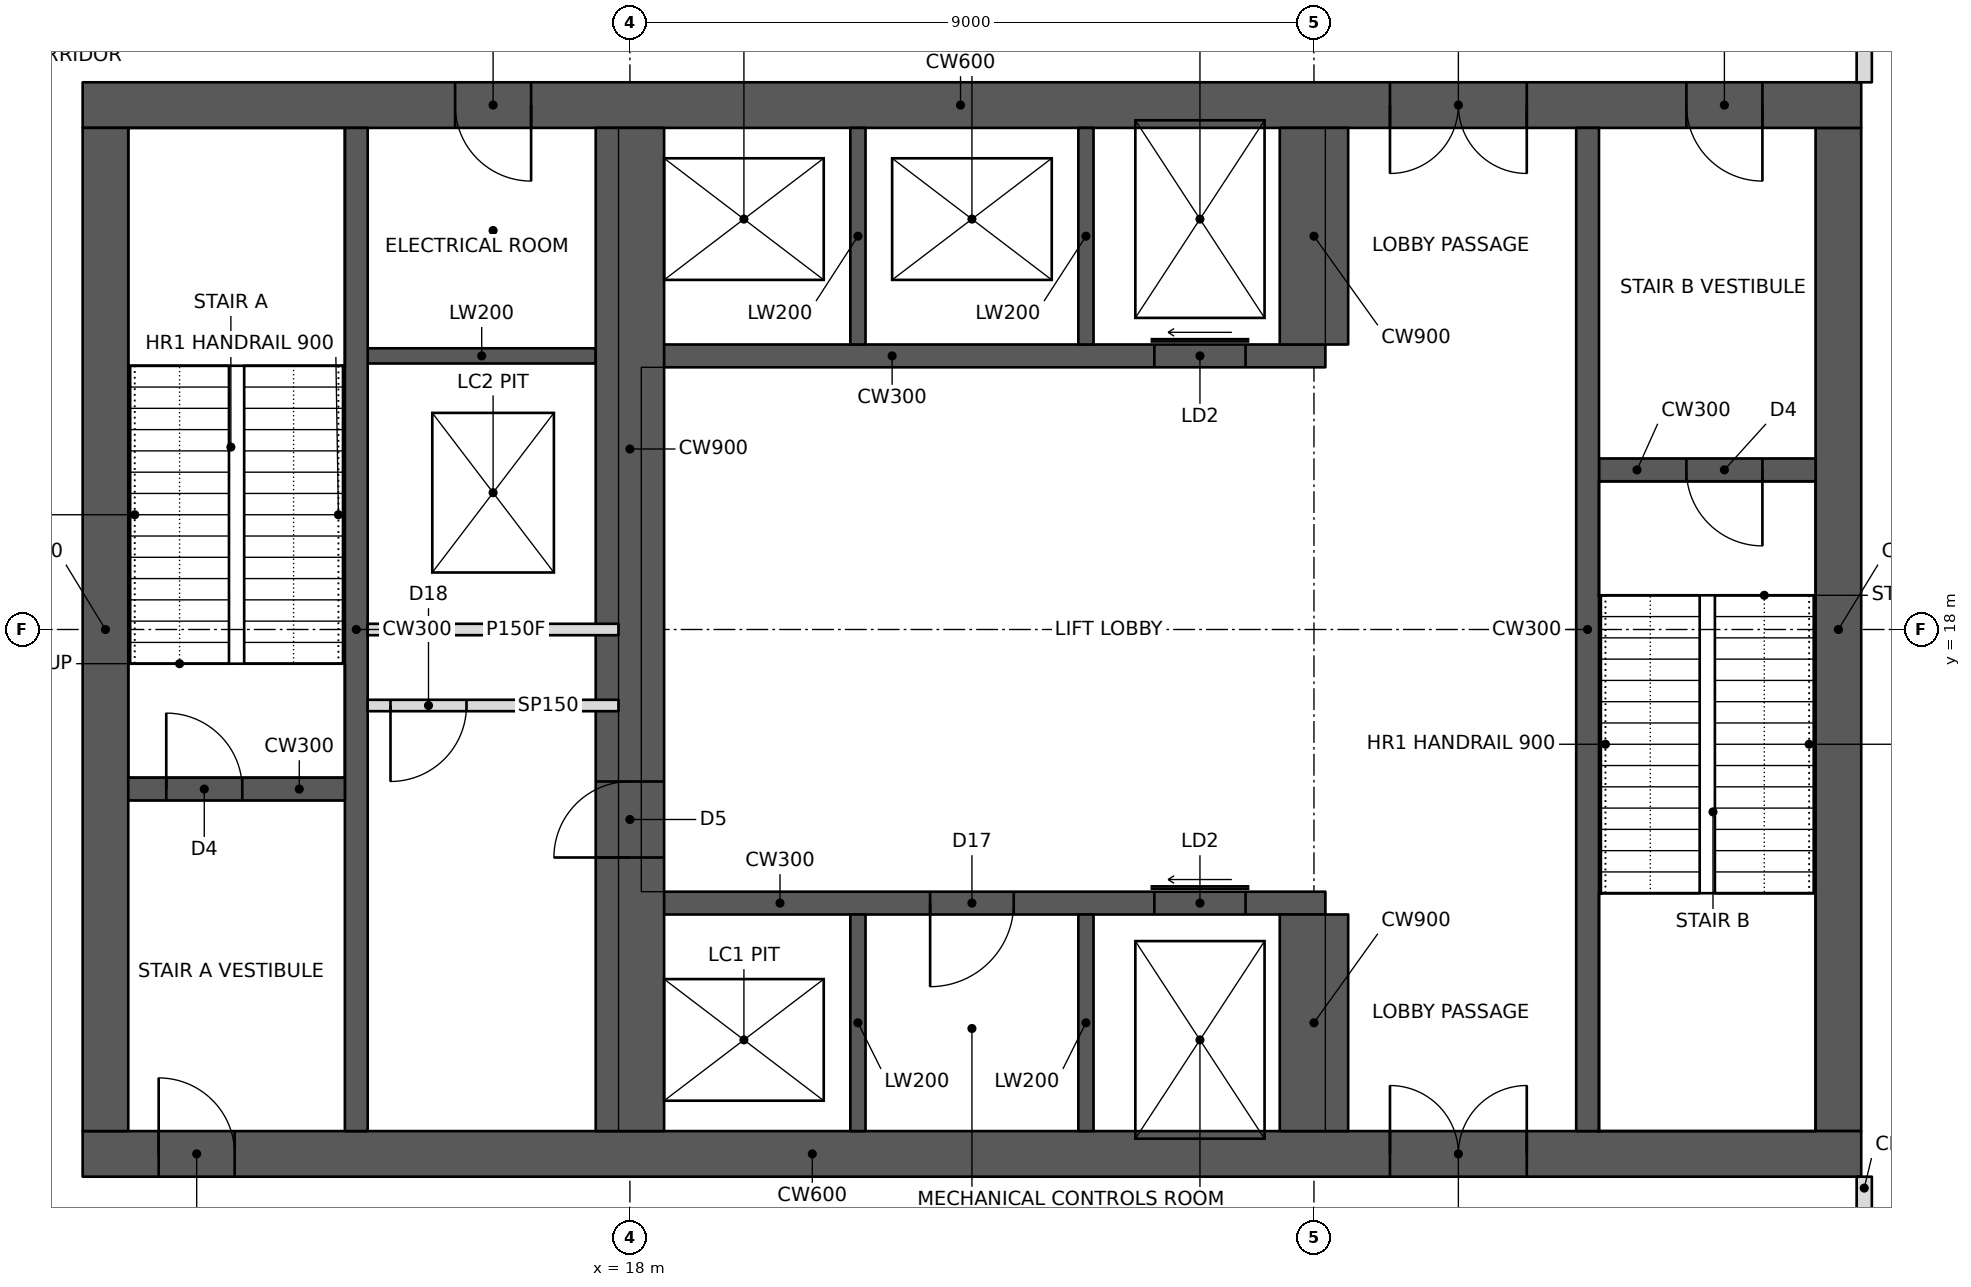
"""IFC4 building model, lengths in metres.
Left out: names, types, materials, properties, quantities, classifications, styles, units other than length and angle.
Written with IfcOpenShell. Run it as: python <this file> out.ifc"""

import sys

from ifc_helpers import new_model, si_unit, direction, frame, frame_2d, origin, place, context, subcontext, project, spatial, rectangle, extrude, element, fill, save


model = new_model("IFC4")
c1 = context("Model", 3, precision=1e-05, world=origin(), true_north=direction((0.0, 1.0)))
c2 = subcontext(c1, "Body", "Model", "MODEL_VIEW")
j1 = project(units=[si_unit("LENGTHUNIT", "METRE"), si_unit("PLANEANGLEUNIT", "RADIAN")], contexts=[c1])
p1 = place(None, origin())
s1 = spatial("IfcSite", under=j1, at=p1, CompositionType="ELEMENT")
p2 = place(p1, origin())
s2 = spatial("IfcBuilding", under=s1, at=p2, CompositionType="ELEMENT")
p3 = place(p2, frame((0.0, 0.0, 155.4)))
s3 = spatial("IfcBuildingStorey", under=s2, at=p3, CompositionType="ELEMENT", Elevation=155.4)
p4 = place(p3, frame((10.8, 11.1, 0.0), z_axis=(0.0, 0.0, 1.0), x_axis=(1.0, 0.0, 0.0)))
e1 = element("IfcWall", 1, at=p4, inside=s3, PredefinedType="SHEAR", context=c2, shape_type="SweptSolid", body=[
    extrude(rectangle(XDim=23.4, YDim=0.6, at=frame_2d((11.7, 0.0))), origin(), (0.0, 0.0, 1.0), 5.0),
])
p5 = place(p4, frame((1.0, 0.0, 0.0)))
e2 = element("IfcOpeningElement", 2, at=p5, cuts=e1, PredefinedType="OPENING", context=c2, shape_type="SweptSolid", body=[
    extrude(rectangle(XDim=1.0, YDim=2.1, at=frame_2d((0.5, 1.05))), frame((0.0, 0.31, 0.0), z_axis=(0.0, -1.0, 0.0), x_axis=(1.0, 0.0, 0.0)), (0.0, 0.0, 1.0), 0.62),
])
p6 = place(p4, frame((17.2, 0.0, 0.0)))
e3 = element("IfcOpeningElement", 3, at=p6, cuts=e1, PredefinedType="OPENING", context=c2, shape_type="SweptSolid", body=[
    extrude(rectangle(XDim=1.8, YDim=2.1, at=frame_2d((0.9, 1.05))), frame((0.0, 0.31, 0.0), z_axis=(0.0, -1.0, 0.0), x_axis=(1.0, 0.0, 0.0)), (0.0, 0.0, 1.0), 0.62),
])
p7 = place(p3, frame((10.8, 24.9, 0.0), z_axis=(0.0, 0.0, 1.0), x_axis=(1.0, 0.0, 0.0)))
e4 = element("IfcWall", 4, at=p7, inside=s3, PredefinedType="SHEAR", context=c2, shape_type="SweptSolid", body=[
    extrude(rectangle(XDim=23.4, YDim=0.6, at=frame_2d((11.7, 0.0))), origin(), (0.0, 0.0, 1.0), 5.0),
])
p8 = place(p7, frame((17.2, 0.0, 0.0)))
e5 = element("IfcOpeningElement", 5, at=p8, cuts=e4, PredefinedType="OPENING", context=c2, shape_type="SweptSolid", body=[
    extrude(rectangle(XDim=1.8, YDim=2.1, at=frame_2d((0.9, 1.05))), frame((0.0, 0.31, 0.0), z_axis=(0.0, -1.0, 0.0), x_axis=(1.0, 0.0, 0.0)), (0.0, 0.0, 1.0), 0.62),
])
p9 = place(p7, frame((21.1, 0.0, 0.0)))
e6 = element("IfcOpeningElement", 6, at=p9, cuts=e4, PredefinedType="OPENING", context=c2, shape_type="SweptSolid", body=[
    extrude(rectangle(XDim=1.0, YDim=2.1, at=frame_2d((0.5, 1.05))), frame((0.0, 0.31, 0.0), z_axis=(0.0, -1.0, 0.0), x_axis=(1.0, 0.0, 0.0)), (0.0, 0.0, 1.0), 0.62),
])
p10 = place(p7, frame((4.9, 0.0, 0.0)))
e7 = element("IfcOpeningElement", 7, at=p10, cuts=e4, PredefinedType="OPENING", context=c2, shape_type="SweptSolid", body=[
    extrude(rectangle(XDim=1.0, YDim=2.1, at=frame_2d((0.5, 1.05))), frame((0.0, 0.31, 0.0), z_axis=(0.0, -1.0, 0.0), x_axis=(1.0, 0.0, 0.0)), (0.0, 0.0, 1.0), 0.62),
])
for number, where, z_axis, x_axis in (
    (8, (11.1, 11.4, 0.0), (0.0, 0.0, 1.0), (0.0, 1.0, 0.0)),
    (9, (33.9, 11.4, 0.0), (0.0, 0.0, 1.0), (0.0, 1.0, 0.0)),
):
    element("IfcWall", number, at=place(p3, frame(where, z_axis=z_axis, x_axis=x_axis)), inside=s3, PredefinedType="SHEAR", context=c2, shape_type="SweptSolid", body=[
        extrude(rectangle(XDim=13.2, YDim=0.6, at=frame_2d((6.6, 0.0))), origin(), (0.0, 0.0, 1.0), 5.0),
    ])
p11 = place(p3, frame((14.4, 11.4, 0.0), z_axis=(0.0, 0.0, 1.0), x_axis=(0.0, 1.0, 0.0)))
e10 = element("IfcWall", 10, at=p11, inside=s3, PredefinedType="SHEAR", context=c2, shape_type="SweptSolid", body=[
    extrude(rectangle(XDim=13.2, YDim=0.3, at=frame_2d((6.6, 0.0))), origin(), (0.0, 0.0, 1.0), 5.0),
])
p12 = place(p3, frame((11.4, 15.9, 0.0), z_axis=(0.0, 0.0, 1.0), x_axis=(1.0, 0.0, 0.0)))
e11 = element("IfcWall", 11, at=p12, inside=s3, PredefinedType="SHEAR", context=c2, shape_type="SweptSolid", body=[
    extrude(rectangle(XDim=2.85, YDim=0.3, at=frame_2d((1.425, 0.0))), origin(), (0.0, 0.0, 1.0), 5.0),
])
p13 = place(p12, frame((0.5, 0.0, 0.0)))
e12 = element("IfcOpeningElement", 12, at=p13, cuts=e11, PredefinedType="OPENING", context=c2, shape_type="SweptSolid", body=[
    extrude(rectangle(XDim=1.0, YDim=2.1, at=frame_2d((0.5, 1.05))), frame((0.0, 0.16, 0.0), z_axis=(0.0, -1.0, 0.0), x_axis=(1.0, 0.0, 0.0)), (0.0, 0.0, 1.0), 0.32),
])
p14 = place(p3, frame((18.0, 11.4, 0.0), z_axis=(0.0, 0.0, 1.0), x_axis=(0.0, 1.0, 0.0)))
e13 = element("IfcWall", 13, at=p14, inside=s3, PredefinedType="SHEAR", context=c2, shape_type="SweptSolid", body=[
    extrude(rectangle(XDim=13.2, YDim=0.9, at=frame_2d((6.6, 0.0))), origin(), (0.0, 0.0, 1.0), 5.0),
])
p15 = place(p14, frame((3.6, 0.0, 0.0)))
e14 = element("IfcOpeningElement", 14, at=p15, cuts=e13, PredefinedType="OPENING", context=c2, shape_type="SweptSolid", body=[
    extrude(rectangle(XDim=1.0, YDim=2.1, at=frame_2d((0.5, 1.05))), frame((0.0, 0.46, 0.0), z_axis=(0.0, -1.0, 0.0), x_axis=(1.0, 0.0, 0.0)), (0.0, 0.0, 1.0), 0.92),
])
p16 = place(p3, frame((14.55, 18.0, 0.0), z_axis=(0.0, 0.0, 1.0), x_axis=(1.0, 0.0, 0.0)))
e15 = element("IfcWall", 15, at=p16, inside=s3, PredefinedType="PARTITIONING", context=c2, shape_type="SweptSolid", body=[
    extrude(rectangle(XDim=3.3, YDim=0.15, at=frame_2d((1.65, 0.0))), origin(), (0.0, 0.0, 1.0), 4.8),
])
p17 = place(p3, frame((18.15, 14.4, 0.0), z_axis=(0.0, 0.0, 1.0), x_axis=(1.0, 0.0, 0.0)))
e16 = element("IfcWall", 16, at=p17, inside=s3, PredefinedType="SHEAR", context=c2, shape_type="SweptSolid", body=[
    extrude(rectangle(XDim=9.0, YDim=0.3, at=frame_2d((4.5, 0.0))), origin(), (0.0, 0.0, 1.0), 5.0),
])
p18 = place(p17, frame((6.75, 0.0, 0.0)))
e17 = element("IfcOpeningElement", 17, at=p18, cuts=e16, PredefinedType="OPENING", context=c2, shape_type="SweptSolid", body=[
    extrude(rectangle(XDim=1.2, YDim=2.1, at=frame_2d((0.6, 1.05))), frame((0.0, 0.16, 0.0), z_axis=(0.0, -1.0, 0.0), x_axis=(1.0, 0.0, 0.0)), (0.0, 0.0, 1.0), 0.32),
])
p19 = place(p17, frame((3.8, 0.0, 0.0)))
e18 = element("IfcOpeningElement", 18, at=p19, cuts=e16, PredefinedType="OPENING", context=c2, shape_type="SweptSolid", body=[
    extrude(rectangle(XDim=1.1, YDim=2.1, at=frame_2d((0.55, 1.05))), frame((0.0, 0.16, 0.0), z_axis=(0.0, -1.0, 0.0), x_axis=(1.0, 0.0, 0.0)), (0.0, 0.0, 1.0), 0.32),
])
p20 = place(p3, frame((27.0, 11.4, 0.0), z_axis=(0.0, 0.0, 1.0), x_axis=(0.0, 1.0, 0.0)))
e19 = element("IfcWall", 19, at=p20, inside=s3, PredefinedType="SHEAR", context=c2, shape_type="SweptSolid", body=[
    extrude(rectangle(XDim=2.85, YDim=0.9, at=frame_2d((1.425, 0.0))), origin(), (0.0, 0.0, 1.0), 5.0),
])
for number, where, z_axis, x_axis in (
    (20, (21.0, 11.4, 0.0), (0.0, 0.0, 1.0), (0.0, 1.0, 0.0)),
    (21, (24.0, 11.4, 0.0), (0.0, 0.0, 1.0), (0.0, 1.0, 0.0)),
):
    element("IfcWall", number, at=place(p3, frame(where, z_axis=z_axis, x_axis=x_axis)), inside=s3, PredefinedType="SHEAR", context=c2, shape_type="SweptSolid", body=[
        extrude(rectangle(XDim=2.85, YDim=0.2, at=frame_2d((1.425, 0.0))), origin(), (0.0, 0.0, 1.0), 5.0),
    ])
p21 = place(p3, frame((18.15, 21.6, 0.0), z_axis=(0.0, 0.0, 1.0), x_axis=(1.0, 0.0, 0.0)))
e22 = element("IfcWall", 22, at=p21, inside=s3, PredefinedType="SHEAR", context=c2, shape_type="SweptSolid", body=[
    extrude(rectangle(XDim=9.0, YDim=0.3, at=frame_2d((4.5, 0.0))), origin(), (0.0, 0.0, 1.0), 5.0),
])
p22 = place(p21, frame((6.75, 0.0, 0.0)))
e23 = element("IfcOpeningElement", 23, at=p22, cuts=e22, PredefinedType="OPENING", context=c2, shape_type="SweptSolid", body=[
    extrude(rectangle(XDim=1.2, YDim=2.1, at=frame_2d((0.6, 1.05))), frame((0.0, 0.16, 0.0), z_axis=(0.0, -1.0, 0.0), x_axis=(1.0, 0.0, 0.0)), (0.0, 0.0, 1.0), 0.32),
])
p23 = place(p3, frame((27.0, 21.75, 0.0), z_axis=(0.0, 0.0, 1.0), x_axis=(0.0, 1.0, 0.0)))
e24 = element("IfcWall", 24, at=p23, inside=s3, PredefinedType="SHEAR", context=c2, shape_type="SweptSolid", body=[
    extrude(rectangle(XDim=2.85, YDim=0.9, at=frame_2d((1.425, 0.0))), origin(), (0.0, 0.0, 1.0), 5.0),
])
for number, where, z_axis, x_axis in (
    (25, (21.0, 21.75, 0.0), (0.0, 0.0, 1.0), (0.0, 1.0, 0.0)),
    (26, (24.0, 21.75, 0.0), (0.0, 0.0, 1.0), (0.0, 1.0, 0.0)),
):
    element("IfcWall", number, at=place(p3, frame(where, z_axis=z_axis, x_axis=x_axis)), inside=s3, PredefinedType="SHEAR", context=c2, shape_type="SweptSolid", body=[
        extrude(rectangle(XDim=2.85, YDim=0.2, at=frame_2d((1.425, 0.0))), origin(), (0.0, 0.0, 1.0), 5.0),
    ])
p24 = place(p3, frame((30.6, 11.4, 0.0), z_axis=(0.0, 0.0, 1.0), x_axis=(0.0, 1.0, 0.0)))
e27 = element("IfcWall", 27, at=p24, inside=s3, PredefinedType="SHEAR", context=c2, shape_type="SweptSolid", body=[
    extrude(rectangle(XDim=13.2, YDim=0.3, at=frame_2d((6.6, 0.0))), origin(), (0.0, 0.0, 1.0), 5.0),
])
p25 = place(p3, frame((30.75, 20.1, 0.0), z_axis=(0.0, 0.0, 1.0), x_axis=(1.0, 0.0, 0.0)))
e28 = element("IfcWall", 28, at=p25, inside=s3, PredefinedType="SHEAR", context=c2, shape_type="SweptSolid", body=[
    extrude(rectangle(XDim=2.85, YDim=0.3, at=frame_2d((1.425, 0.0))), origin(), (0.0, 0.0, 1.0), 5.0),
])
p26 = place(p25, frame((1.15, 0.0, 0.0)))
e29 = element("IfcOpeningElement", 29, at=p26, cuts=e28, PredefinedType="OPENING", context=c2, shape_type="SweptSolid", body=[
    extrude(rectangle(XDim=1.0, YDim=2.1, at=frame_2d((0.5, 1.05))), frame((0.0, 0.16, 0.0), z_axis=(0.0, -1.0, 0.0), x_axis=(1.0, 0.0, 0.0)), (0.0, 0.0, 1.0), 0.32),
])
p27 = place(p3, frame((14.55, 21.6, 0.0), z_axis=(0.0, 0.0, 1.0), x_axis=(1.0, 0.0, 0.0)))
e30 = element("IfcWall", 30, at=p27, inside=s3, PredefinedType="SHEAR", context=c2, shape_type="SweptSolid", body=[
    extrude(rectangle(XDim=3.0, YDim=0.2, at=frame_2d((1.5, 0.0))), origin(), (0.0, 0.0, 1.0), 5.0),
])
p28 = place(p3, frame((34.24, 9.1, 0.0), z_axis=(0.0, 0.0, 1.0), x_axis=(0.0, 1.0, 0.0)))
e31 = element("IfcWall", 31, at=p28, inside=s3, PredefinedType="PARTITIONING", context=c2, shape_type="SweptSolid", body=[
    extrude(rectangle(XDim=1.7, YDim=0.2, at=frame_2d((0.85, 0.0))), origin(), (0.0, 0.0, 1.0), 4.004),
])
p29 = place(p28, frame((0.25, 0.0, 0.0)))
e32 = element("IfcOpeningElement", 32, at=p29, cuts=e31, PredefinedType="OPENING", context=c2, shape_type="SweptSolid", body=[
    extrude(rectangle(XDim=1.0, YDim=2.1, at=frame_2d((0.5, 1.05))), frame((0.0, 0.11, 0.0), z_axis=(0.0, -1.0, 0.0), x_axis=(1.0, 0.0, 0.0)), (0.0, 0.0, 1.0), 0.22),
])
p30 = place(p3, frame((34.24, 25.2, 0.0), z_axis=(0.0, 0.0, 1.0), x_axis=(0.0, 1.0, 0.0)))
e33 = element("IfcWall", 33, at=p30, inside=s3, PredefinedType="PARTITIONING", context=c2, shape_type="SweptSolid", body=[
    extrude(rectangle(XDim=1.7, YDim=0.2, at=frame_2d((0.85, 0.0))), origin(), (0.0, 0.0, 1.0), 4.004),
])
p31 = place(p3, frame((14.55, 17.0, 0.0), z_axis=(0.0, 0.0, 1.0), x_axis=(1.0, 0.0, 0.0)))
e34 = element("IfcWall", 34, at=p31, inside=s3, PredefinedType="PARTITIONING", context=c2, shape_type="SweptSolid", body=[
    extrude(rectangle(XDim=3.3, YDim=0.15, at=frame_2d((1.65, 0.0))), origin(), (0.0, 0.0, 1.0), 4.8),
])
p32 = place(p31, frame((0.3, 0.0, 0.0)))
e35 = element("IfcOpeningElement", 35, at=p32, cuts=e34, PredefinedType="OPENING", context=c2, shape_type="SweptSolid", body=[
    extrude(rectangle(XDim=1.0, YDim=2.1, at=frame_2d((0.5, 1.05))), frame((0.0, 0.085, 0.0), z_axis=(0.0, -1.0, 0.0), x_axis=(1.0, 0.0, 0.0)), (0.0, 0.0, 1.0), 0.17),
])
p33 = place(p32, frame((1.0, 0.0, 0.0), z_axis=(0.0, 0.0, 1.0), x_axis=(-1.0, 0.0, 0.0)))
e36 = element("IfcDoor", 36, at=p33, inside=s3, OperationType="SINGLE_SWING_RIGHT", PredefinedType="DOOR", context=c2, shape_type="SweptSolid", body=[
    extrude(rectangle(XDim=1.0, YDim=2.1, at=frame_2d((0.5, 1.05))), frame((0.0, 0.025, 0.0), z_axis=(0.0, -1.0, 0.0), x_axis=(1.0, 0.0, 0.0)), (0.0, 0.0, 1.0), 0.05),
])
fill(e35, e36)
p34 = place(p5, origin())
e37 = element("IfcDoor", 37, at=p34, inside=s3, OperationType="SINGLE_SWING_LEFT", PredefinedType="DOOR", context=c2, shape_type="SweptSolid", body=[
    extrude(rectangle(XDim=1.0, YDim=2.1, at=frame_2d((0.5, 1.05))), frame((0.0, 0.025, 0.0), z_axis=(0.0, -1.0, 0.0), x_axis=(1.0, 0.0, 0.0)), (0.0, 0.0, 1.0), 0.05),
])
fill(e2, e37)
p35 = place(p13, origin())
e38 = element("IfcDoor", 38, at=p35, inside=s3, OperationType="SINGLE_SWING_LEFT", PredefinedType="DOOR", context=c2, shape_type="SweptSolid", body=[
    extrude(rectangle(XDim=1.0, YDim=2.1, at=frame_2d((0.5, 1.05))), frame((0.0, 0.025, 0.0), z_axis=(0.0, -1.0, 0.0), x_axis=(1.0, 0.0, 0.0)), (0.0, 0.0, 1.0), 0.05),
])
fill(e12, e38)
p36 = place(p6, origin())
e39 = element("IfcDoor", 39, at=p36, inside=s3, OperationType="DOUBLE_DOOR_SINGLE_SWING", PredefinedType="DOOR", context=c2, shape_type="SweptSolid", body=[
    extrude(rectangle(XDim=1.8, YDim=2.1, at=frame_2d((0.9, 1.05))), frame((0.0, 0.025, 0.0), z_axis=(0.0, -1.0, 0.0), x_axis=(1.0, 0.0, 0.0)), (0.0, 0.0, 1.0), 0.05),
])
fill(e3, e39)
p37 = place(p8, frame((1.8, 0.0, 0.0), z_axis=(0.0, 0.0, 1.0), x_axis=(-1.0, 0.0, 0.0)))
e40 = element("IfcDoor", 40, at=p37, inside=s3, OperationType="DOUBLE_DOOR_SINGLE_SWING", PredefinedType="DOOR", context=c2, shape_type="SweptSolid", body=[
    extrude(rectangle(XDim=1.8, YDim=2.1, at=frame_2d((0.9, 1.05))), frame((0.0, 0.025, 0.0), z_axis=(0.0, -1.0, 0.0), x_axis=(1.0, 0.0, 0.0)), (0.0, 0.0, 1.0), 0.05),
])
fill(e5, e40)
p38 = place(p9, frame((1.0, 0.0, 0.0), z_axis=(0.0, 0.0, 1.0), x_axis=(-1.0, 0.0, 0.0)))
e41 = element("IfcDoor", 41, at=p38, inside=s3, OperationType="SINGLE_SWING_LEFT", PredefinedType="DOOR", context=c2, shape_type="SweptSolid", body=[
    extrude(rectangle(XDim=1.0, YDim=2.1, at=frame_2d((0.5, 1.05))), frame((0.0, 0.025, 0.0), z_axis=(0.0, -1.0, 0.0), x_axis=(1.0, 0.0, 0.0)), (0.0, 0.0, 1.0), 0.05),
])
fill(e6, e41)
p39 = place(p26, frame((1.0, 0.0, 0.0), z_axis=(0.0, 0.0, 1.0), x_axis=(-1.0, 0.0, 0.0)))
e42 = element("IfcDoor", 42, at=p39, inside=s3, OperationType="SINGLE_SWING_LEFT", PredefinedType="DOOR", context=c2, shape_type="SweptSolid", body=[
    extrude(rectangle(XDim=1.0, YDim=2.1, at=frame_2d((0.5, 1.05))), frame((0.0, 0.025, 0.0), z_axis=(0.0, -1.0, 0.0), x_axis=(1.0, 0.0, 0.0)), (0.0, 0.0, 1.0), 0.05),
])
fill(e29, e42)
p40 = place(p15, origin())
e43 = element("IfcDoor", 43, at=p40, inside=s3, OperationType="SINGLE_SWING_LEFT", PredefinedType="DOOR", context=c2, shape_type="SweptSolid", body=[
    extrude(rectangle(XDim=1.0, YDim=2.1, at=frame_2d((0.5, 1.05))), frame((0.0, 0.025, 0.0), z_axis=(0.0, -1.0, 0.0), x_axis=(1.0, 0.0, 0.0)), (0.0, 0.0, 1.0), 0.05),
])
fill(e14, e43)
p41 = place(p10, frame((1.0, 0.0, 0.0), z_axis=(0.0, 0.0, 1.0), x_axis=(-1.0, 0.0, 0.0)))
e44 = element("IfcDoor", 44, at=p41, inside=s3, OperationType="SINGLE_SWING_LEFT", PredefinedType="DOOR", context=c2, shape_type="SweptSolid", body=[
    extrude(rectangle(XDim=1.0, YDim=2.1, at=frame_2d((0.5, 1.05))), frame((0.0, 0.025, 0.0), z_axis=(0.0, -1.0, 0.0), x_axis=(1.0, 0.0, 0.0)), (0.0, 0.0, 1.0), 0.05),
])
fill(e7, e44)
p42 = place(p18, origin())
e45 = element("IfcDoor", 45, at=p42, inside=s3, OperationType="SLIDING_TO_LEFT", PredefinedType="DOOR", context=c2, shape_type="SweptSolid", body=[
    extrude(rectangle(XDim=1.2, YDim=2.1, at=frame_2d((0.6, 1.05))), frame((0.0, 0.025, 0.0), z_axis=(0.0, -1.0, 0.0), x_axis=(1.0, 0.0, 0.0)), (0.0, 0.0, 1.0), 0.05),
])
fill(e17, e45)
p43 = place(p22, origin())
e46 = element("IfcDoor", 46, at=p43, inside=s3, OperationType="SLIDING_TO_LEFT", PredefinedType="DOOR", context=c2, shape_type="SweptSolid", body=[
    extrude(rectangle(XDim=1.2, YDim=2.1, at=frame_2d((0.6, 1.05))), frame((0.0, 0.025, 0.0), z_axis=(0.0, -1.0, 0.0), x_axis=(1.0, 0.0, 0.0)), (0.0, 0.0, 1.0), 0.05),
])
fill(e23, e46)
p44 = place(p19, frame((1.1, 0.0, 0.0), z_axis=(0.0, 0.0, 1.0), x_axis=(-1.0, 0.0, 0.0)))
e47 = element("IfcDoor", 47, at=p44, inside=s3, OperationType="SINGLE_SWING_RIGHT", PredefinedType="DOOR", context=c2, shape_type="SweptSolid", body=[
    extrude(rectangle(XDim=1.1, YDim=2.1, at=frame_2d((0.55, 1.05))), frame((0.0, 0.025, 0.0), z_axis=(0.0, -1.0, 0.0), x_axis=(1.0, 0.0, 0.0)), (0.0, 0.0, 1.0), 0.05),
])
fill(e18, e47)
save(model, sys.argv[1])
